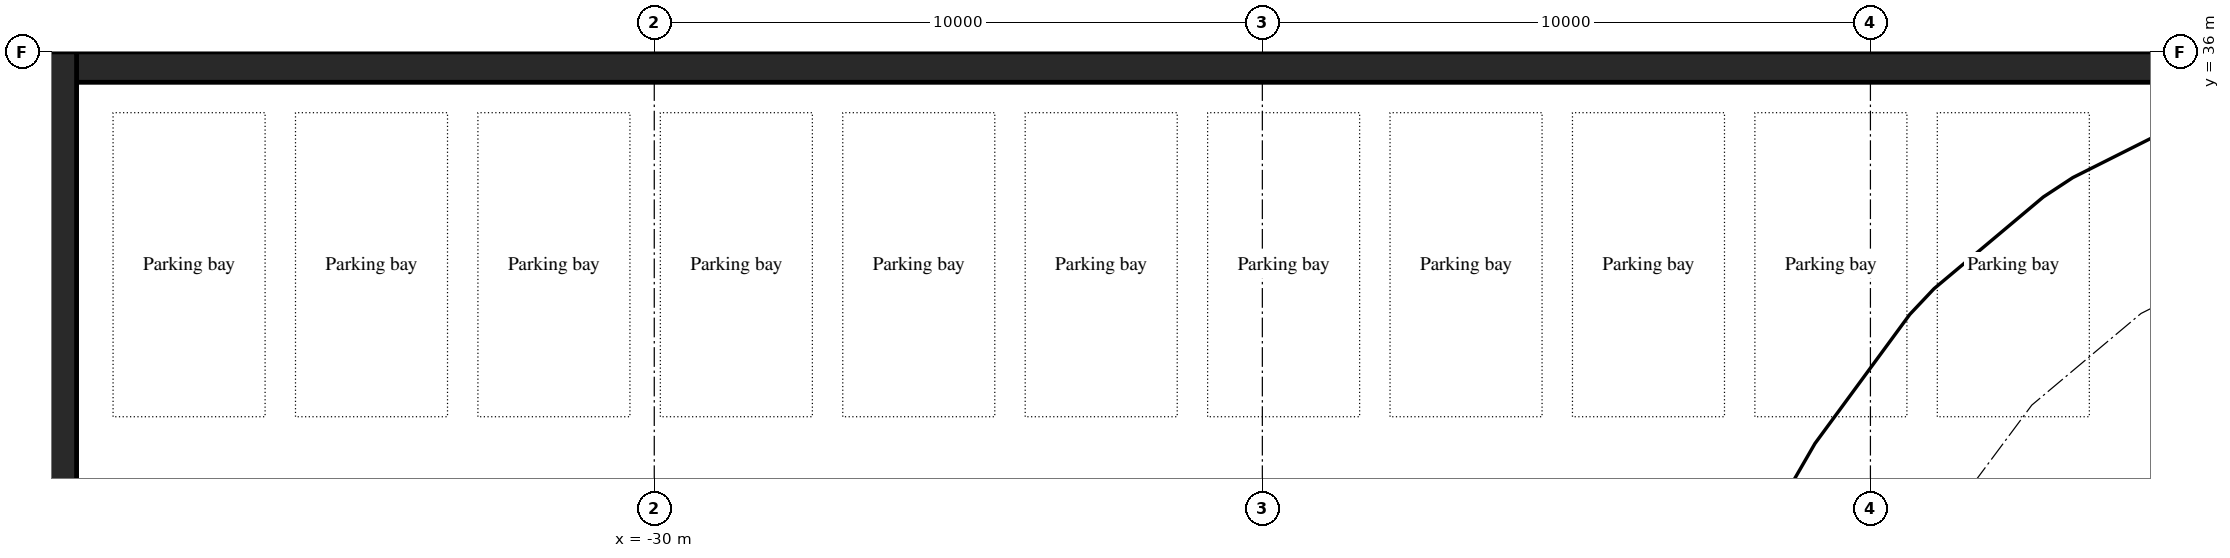
"""IFC4 building model, lengths in metres.
Left out: names, types, materials, properties, quantities, classifications, styles, units other than length and angle.
Written with IfcOpenShell. Run it as: python <this file> out.ifc"""

import sys

from ifc_helpers import new_model, si_unit, direction, frame, frame_2d, origin, place, context, subcontext, project, spatial, rectangle, extrude, element, save


model = new_model("IFC4")
c1 = context("Model", 3, precision=1e-05, world=origin(), true_north=direction((0.0, 1.0)))
c2 = subcontext(c1, "Body", "Model", "MODEL_VIEW")
j1 = project(units=[si_unit("LENGTHUNIT", "METRE"), si_unit("PLANEANGLEUNIT", "RADIAN")], contexts=[c1])
p1 = place(None, origin())
s1 = spatial("IfcSite", under=j1, at=p1, CompositionType="ELEMENT")
p2 = place(p1, origin())
s2 = spatial("IfcBuilding", under=s1, at=p2, CompositionType="ELEMENT")
p3 = place(p2, frame((0.0, 0.0, -8.4)))
s3 = spatial("IfcBuildingStorey", under=s2, at=p3, CompositionType="ELEMENT", Elevation=-8.4)
p4 = place(p3, frame((40.0, 35.75, -0.4), z_axis=(0.0, 0.0, 1.0), x_axis=(-1.0, 0.0, 0.0)))
e1 = element("IfcWall", 1, at=p4, inside=s3, PredefinedType="SOLIDWALL", context=c2, shape_type="SweptSolid", body=[
    extrude(rectangle(XDim=80.0, YDim=0.5, at=frame_2d((40.0, 0.0))), origin(), (0.0, 0.0, 1.0), 4.22),
])
p5 = place(p3, frame((-39.75, 36.0, -0.4), z_axis=(0.0, 0.0, 1.0), x_axis=(0.0, -1.0, 0.0)))
e2 = element("IfcWall", 2, at=p5, inside=s3, PredefinedType="SOLIDWALL", context=c2, shape_type="SweptSolid", body=[
    extrude(rectangle(XDim=62.0, YDim=0.5, at=frame_2d((31.0, 0.0))), origin(), (0.0, 0.0, 1.0), 4.22),
])
save(model, sys.argv[1])
